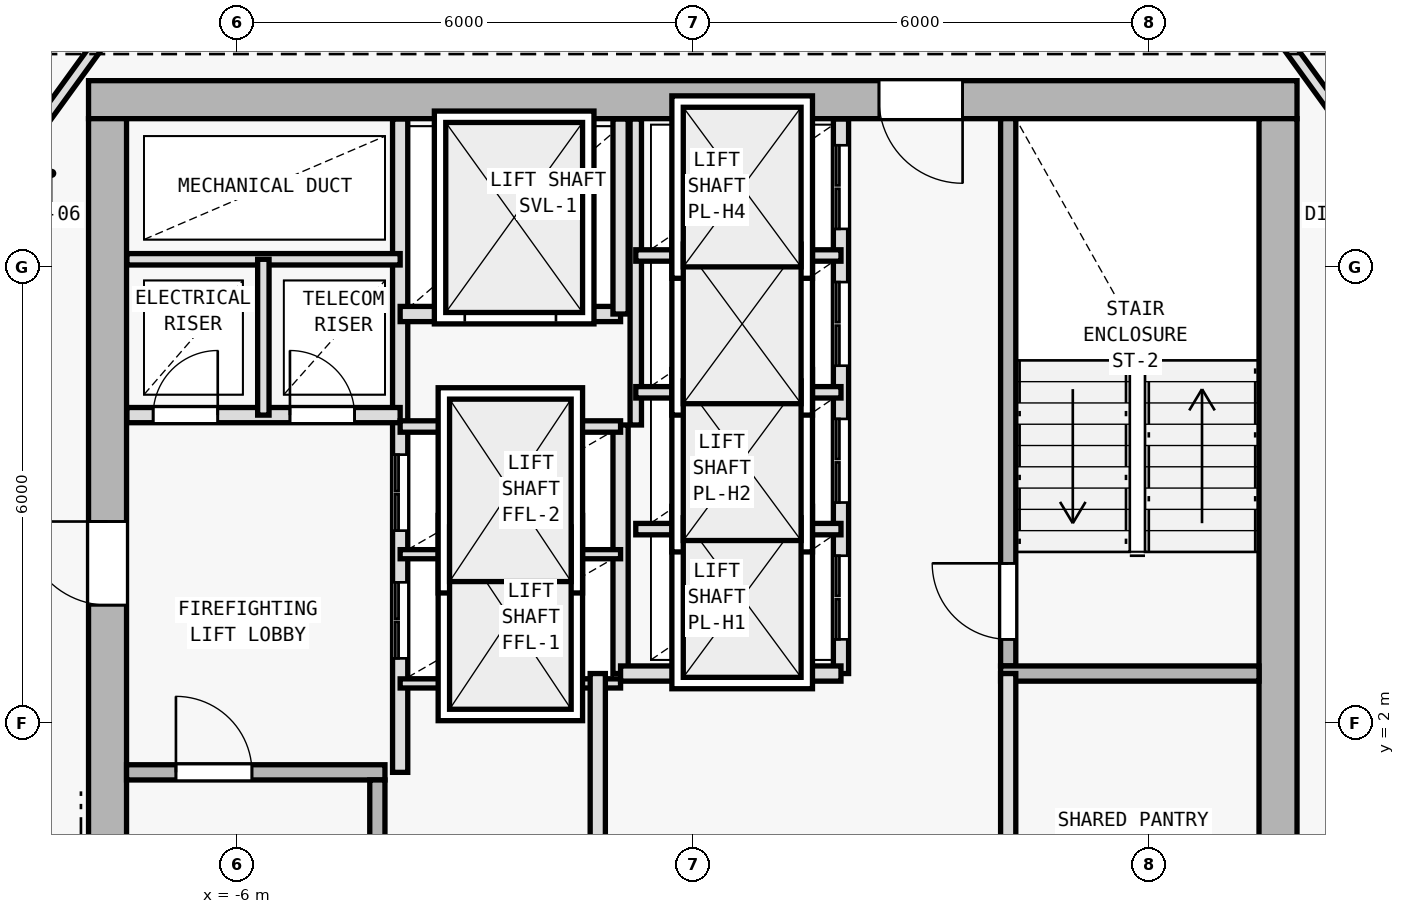
"""IFC4 building model, lengths in metres.
Left out: names, types, materials, properties, quantities, classifications, styles, units other than length and angle.
Written with IfcOpenShell. Run it as: python <this file> out.ifc"""

import sys

from ifc_helpers import new_model, si_unit, direction, frame, frame_2d, origin, origin_2d, place, context, subcontext, project, spatial, rectangle, i_section, extrude, element, fill, save


model = new_model("IFC4")
c1 = context("Model", 3, precision=1e-05, world=origin(), true_north=direction((0.0, 1.0)))
c2 = subcontext(c1, "Body", "Model", "MODEL_VIEW")
j1 = project(units=[si_unit("LENGTHUNIT", "METRE"), si_unit("PLANEANGLEUNIT", "RADIAN")], contexts=[c1])
p1 = place(None, origin())
s1 = spatial("IfcSite", under=j1, at=p1, CompositionType="ELEMENT")
p2 = place(p1, origin())
s2 = spatial("IfcBuilding", under=s1, at=p2, CompositionType="ELEMENT")
p3 = place(p2, frame((0.0, 0.0, 250.8)))
s3 = spatial("IfcBuildingStorey", under=s2, at=p3, CompositionType="ELEMENT", Elevation=250.8)
for number, where, z_axis, x_axis in (
    (1, (7.7, 10.2, 0.0), (0.0, 0.0, 1.0), (1.0, 0.0, 0.0)),
    (2, (-7.7, 10.2, 0.0), (0.0, 0.0, 1.0), (1.0, 0.0, 0.0)),
    (3, (7.7, 0.4, 0.0), (0.0, 0.0, 1.0), (1.0, 0.0, 0.0)),
    (4, (-7.7, 2.0, 0.0), (0.0, 0.0, 1.0), (1.0, 0.0, 0.0)),
):
    element("IfcColumn", number, at=place(p3, frame(where, z_axis=z_axis, x_axis=x_axis)), inside=s3, PredefinedType="COLUMN", context=c2, shape_type="SweptSolid", body=[
        extrude(i_section(OverallWidth=0.374, OverallDepth=0.372, WebThickness=0.012, FlangeThickness=0.02, FilletRadius=0.015, at=origin_2d()), origin(), (0.0, 0.0, 1.0), 3.6),
    ])
p4 = place(p3, frame((7.95, 10.2, 0.0), z_axis=(0.0, 0.0, 1.0), x_axis=(-1.0, 0.0, 0.0)))
e5 = element("IfcWall", 5, at=p4, inside=s3, PredefinedType="SHEAR", context=c2, shape_type="SweptSolid", body=[
    extrude(rectangle(XDim=15.9, YDim=0.5, at=frame_2d((7.95, 0.0))), origin(), (0.0, 0.0, 1.0), 3.35),
])
p5 = place(p4, frame((4.4, 0.0, 0.0)))
e6 = element("IfcOpeningElement", 6, at=p5, cuts=e5, PredefinedType="OPENING", context=c2, shape_type="SweptSolid", body=[
    extrude(rectangle(XDim=1.1, YDim=2.15, at=frame_2d((0.55, 1.075))), frame((0.0, 0.26, 0.0), z_axis=(0.0, -1.0, 0.0), x_axis=(1.0, 0.0, 0.0)), (0.0, 0.0, 1.0), 0.52),
])
p6 = place(p3, frame((-7.7, -9.15, 0.0), z_axis=(0.0, 0.0, 1.0), x_axis=(0.0, 1.0, 0.0)))
e7 = element("IfcWall", 7, at=p6, inside=s3, PredefinedType="SHEAR", context=c2, shape_type="SweptSolid", body=[
    extrude(rectangle(XDim=19.1, YDim=0.5, at=frame_2d((9.55, 0.0))), origin(), (0.0, 0.0, 1.0), 3.35),
])
p7 = place(p6, frame((12.7, 0.0, 0.0)))
e8 = element("IfcOpeningElement", 8, at=p7, cuts=e7, PredefinedType="OPENING", context=c2, shape_type="SweptSolid", body=[
    extrude(rectangle(XDim=1.1, YDim=2.15, at=frame_2d((0.55, 1.075))), frame((0.0, 0.26, 0.0), z_axis=(0.0, -1.0, 0.0), x_axis=(1.0, 0.0, 0.0)), (0.0, 0.0, 1.0), 0.52),
])
p8 = place(p3, frame((7.7, 9.95, 0.0), z_axis=(0.0, 0.0, 1.0), x_axis=(0.0, -1.0, 0.0)))
e9 = element("IfcWall", 9, at=p8, inside=s3, PredefinedType="SHEAR", context=c2, shape_type="SweptSolid", body=[
    extrude(rectangle(XDim=19.1, YDim=0.5, at=frame_2d((9.55, 0.0))), origin(), (0.0, 0.0, 1.0), 3.35),
])
p9 = place(p3, frame((-7.45, 1.35, 0.0), z_axis=(0.0, 0.0, 1.0), x_axis=(1.0, 0.0, 0.0)))
e10 = element("IfcWall", 10, at=p9, inside=s3, PredefinedType="SOLIDWALL", context=c2, shape_type="SweptSolid", body=[
    extrude(rectangle(XDim=3.4, YDim=0.2, at=frame_2d((1.7, 0.0))), origin(), (0.0, 0.0, 1.0), 3.35),
])
p10 = place(p9, frame((0.65, 0.0, 0.0)))
e11 = element("IfcOpeningElement", 11, at=p10, cuts=e10, PredefinedType="OPENING", context=c2, shape_type="SweptSolid", body=[
    extrude(rectangle(XDim=1.0, YDim=2.15, at=frame_2d((0.5, 1.075))), frame((0.0, 0.11, 0.0), z_axis=(0.0, -1.0, 0.0), x_axis=(1.0, 0.0, 0.0)), (0.0, 0.0, 1.0), 0.22),
])
p11 = place(p3, frame((-4.15, -5.95, 0.0), z_axis=(0.0, 0.0, 1.0), x_axis=(0.0, 1.0, 0.0)))
e12 = element("IfcWall", 12, at=p11, inside=s3, PredefinedType="SOLIDWALL", context=c2, shape_type="SweptSolid", body=[
    extrude(rectangle(XDim=7.2, YDim=0.2, at=frame_2d((3.6, 0.0))), origin(), (0.0, 0.0, 1.0), 3.35),
])
p12 = place(p3, frame((-3.85, 1.35, 0.0), z_axis=(0.0, 0.0, 1.0), x_axis=(0.0, 1.0, 0.0)))
e13 = element("IfcWall", 13, at=p12, inside=s3, PredefinedType="SOLIDWALL", context=c2, shape_type="SweptSolid", body=[
    extrude(rectangle(XDim=8.595, YDim=0.2, at=frame_2d((4.297, 0.0))), origin(), (0.0, 0.0, 1.0), 3.35),
])
p13 = place(p12, frame((1.5, 0.0, 0.0)))
e14 = element("IfcOpeningElement", 14, at=p13, cuts=e13, PredefinedType="OPENING", context=c2, shape_type="SweptSolid", body=[
    extrude(rectangle(XDim=1.0, YDim=2.15, at=frame_2d((0.5, 1.075))), frame((0.0, 0.11, 0.0), z_axis=(0.0, -1.0, 0.0), x_axis=(1.0, 0.0, 0.0)), (0.0, 0.0, 1.0), 0.22),
])
p14 = place(p12, frame((3.18, 0.0, 0.0)))
e15 = element("IfcOpeningElement", 15, at=p14, cuts=e13, PredefinedType="OPENING", context=c2, shape_type="SweptSolid", body=[
    extrude(rectangle(XDim=1.0, YDim=2.15, at=frame_2d((0.5, 1.075))), frame((0.0, 0.11, 0.0), z_axis=(0.0, -1.0, 0.0), x_axis=(1.0, 0.0, 0.0)), (0.0, 0.0, 1.0), 0.22),
])
p15 = place(p3, frame((-7.445, 6.05, 0.0), z_axis=(0.0, 0.0, 1.0), x_axis=(1.0, 0.0, 0.0)))
e16 = element("IfcWall", 16, at=p15, inside=s3, PredefinedType="SOLIDWALL", context=c2, shape_type="SweptSolid", body=[
    extrude(rectangle(XDim=3.595, YDim=0.2, at=frame_2d((1.797, 0.0))), origin(), (0.0, 0.0, 1.0), 3.35),
])
p16 = place(p15, frame((0.345, 0.0, 0.0)))
e17 = element("IfcOpeningElement", 17, at=p16, cuts=e16, PredefinedType="OPENING", context=c2, shape_type="SweptSolid", body=[
    extrude(rectangle(XDim=0.85, YDim=2.1, at=frame_2d((0.425, 1.05))), frame((0.0, 0.11, 0.0), z_axis=(0.0, -1.0, 0.0), x_axis=(1.0, 0.0, 0.0)), (0.0, 0.0, 1.0), 0.22),
])
p17 = place(p15, frame((2.145, 0.0, 0.0)))
e18 = element("IfcOpeningElement", 18, at=p17, cuts=e16, PredefinedType="OPENING", context=c2, shape_type="SweptSolid", body=[
    extrude(rectangle(XDim=0.85, YDim=2.1, at=frame_2d((0.425, 1.05))), frame((0.0, 0.11, 0.0), z_axis=(0.0, -1.0, 0.0), x_axis=(1.0, 0.0, 0.0)), (0.0, 0.0, 1.0), 0.22),
])
p18 = place(p3, frame((-7.445, 8.1, 0.0), z_axis=(0.0, 0.0, 1.0), x_axis=(1.0, 0.0, 0.0)))
e19 = element("IfcWall", 19, at=p18, inside=s3, PredefinedType="PARTITIONING", context=c2, shape_type="SweptSolid", body=[
    extrude(rectangle(XDim=3.595, YDim=0.15, at=frame_2d((1.797, 0.0))), origin(), (0.0, 0.0, 1.0), 3.35),
])
p19 = place(p3, frame((-5.65, 6.05, 0.0), z_axis=(0.0, 0.0, 1.0), x_axis=(0.0, 1.0, 0.0)))
e20 = element("IfcWall", 20, at=p19, inside=s3, PredefinedType="PARTITIONING", context=c2, shape_type="SweptSolid", body=[
    extrude(rectangle(XDim=2.05, YDim=0.15, at=frame_2d((1.025, 0.0))), origin(), (0.0, 0.0, 1.0), 3.35),
])
p20 = place(p3, frame((4.15, 2.75, 0.0), z_axis=(0.0, 0.0, 1.0), x_axis=(0.0, 1.0, 0.0)))
e21 = element("IfcWall", 21, at=p20, inside=s3, PredefinedType="SOLIDWALL", context=c2, shape_type="SweptSolid", body=[
    extrude(rectangle(XDim=7.2, YDim=0.2, at=frame_2d((3.6, 0.0))), origin(), (0.0, 0.0, 1.0), 3.35),
])
p21 = place(p20, frame((0.35, 0.0, 0.0)))
e22 = element("IfcOpeningElement", 22, at=p21, cuts=e21, PredefinedType="OPENING", context=c2, shape_type="SweptSolid", body=[
    extrude(rectangle(XDim=1.0, YDim=2.15, at=frame_2d((0.5, 1.075))), frame((0.0, 0.11, 0.0), z_axis=(0.0, -1.0, 0.0), x_axis=(1.0, 0.0, 0.0)), (0.0, 0.0, 1.0), 0.22),
])
p22 = place(p3, frame((4.05, 2.65, 0.0), z_axis=(0.0, 0.0, 1.0), x_axis=(1.0, 0.0, 0.0)))
e23 = element("IfcWall", 23, at=p22, inside=s3, PredefinedType="SOLIDWALL", context=c2, shape_type="SweptSolid", body=[
    extrude(rectangle(XDim=3.4, YDim=0.2, at=frame_2d((1.7, 0.0))), origin(), (0.0, 0.0, 1.0), 3.35),
])
p23 = place(p3, frame((-0.95, 2.65, 0.0), z_axis=(0.0, 0.0, 1.0), x_axis=(0.0, 1.0, 0.0)))
e24 = element("IfcWall", 24, at=p23, inside=s3, PredefinedType="SOLIDWALL", context=c2, shape_type="SweptSolid", body=[
    extrude(rectangle(XDim=3.27, YDim=0.2, at=frame_2d((1.635, 0.0))), origin(), (0.0, 0.0, 1.0), 3.35),
])
for number, where, z_axis, x_axis in (
    (25, (-3.85, 2.52, 0.0), (0.0, 0.0, 1.0), (1.0, 0.0, 0.0)),
    (26, (-3.85, 4.22, 0.0), (0.0, 0.0, 1.0), (1.0, 0.0, 0.0)),
):
    element("IfcWall", number, at=place(p3, frame(where, z_axis=z_axis, x_axis=x_axis)), inside=s3, PredefinedType="PARTITIONING", context=c2, shape_type="SweptSolid", body=[
        extrude(rectangle(XDim=2.9, YDim=0.12, at=frame_2d((1.45, 0.0))), origin(), (0.0, 0.0, 1.0), 3.35),
    ])
p24 = place(p3, frame((-3.85, 5.9, 0.0), z_axis=(0.0, 0.0, 1.0), x_axis=(1.0, 0.0, 0.0)))
e27 = element("IfcWall", 27, at=p24, inside=s3, PredefinedType="PARTITIONING", context=c2, shape_type="SweptSolid", body=[
    extrude(rectangle(XDim=2.9, YDim=0.15, at=frame_2d((1.45, 0.0))), origin(), (0.0, 0.0, 1.0), 3.35),
])
p25 = place(p3, frame((-3.85, 7.38, 0.0), z_axis=(0.0, 0.0, 1.0), x_axis=(1.0, 0.0, 0.0)))
e28 = element("IfcWall", 28, at=p25, inside=s3, PredefinedType="SOLIDWALL", context=c2, shape_type="SweptSolid", body=[
    extrude(rectangle(XDim=2.9, YDim=0.2, at=frame_2d((1.45, 0.0))), origin(), (0.0, 0.0, 1.0), 3.35),
])
p26 = place(p25, frame((0.85, 0.0, 0.0)))
e29 = element("IfcOpeningElement", 29, at=p26, cuts=e28, PredefinedType="OPENING", context=c2, shape_type="SweptSolid", body=[
    extrude(rectangle(XDim=1.2, YDim=2.2, at=frame_2d((0.6, 1.1))), frame((0.0, 0.11, 0.0), z_axis=(0.0, -1.0, 0.0), x_axis=(1.0, 0.0, 0.0)), (0.0, 0.0, 1.0), 0.22),
])
p27 = place(p3, frame((-0.95, 7.38, 0.0), z_axis=(0.0, 0.0, 1.0), x_axis=(0.0, 1.0, 0.0)))
e30 = element("IfcWall", 30, at=p27, inside=s3, PredefinedType="SOLIDWALL", context=c2, shape_type="SweptSolid", body=[
    extrude(rectangle(XDim=2.565, YDim=0.2, at=frame_2d((1.283, 0.0))), origin(), (0.0, 0.0, 1.0), 3.35),
])
p28 = place(p3, frame((4.15, -6.05, 0.0), z_axis=(0.0, 0.0, 1.0), x_axis=(0.0, 1.0, 0.0)))
e31 = element("IfcWall", 31, at=p28, inside=s3, PredefinedType="SOLIDWALL", context=c2, shape_type="SweptSolid", body=[
    extrude(rectangle(XDim=8.7, YDim=0.2, at=frame_2d((4.35, 0.0))), origin(), (0.0, 0.0, 1.0), 3.35),
])
p29 = place(p28, frame((3.6, 0.0, 0.0)))
e32 = element("IfcOpeningElement", 32, at=p29, cuts=e31, PredefinedType="OPENING", context=c2, shape_type="SweptSolid", body=[
    extrude(rectangle(XDim=0.95, YDim=2.1, at=frame_2d((0.475, 1.05))), frame((0.0, 0.11, 0.0), z_axis=(0.0, -1.0, 0.0), x_axis=(1.0, 0.0, 0.0)), (0.0, 0.0, 1.0), 0.22),
])
p30 = place(p3, frame((-1.25, -6.05, 0.0), z_axis=(0.0, 0.0, 1.0), x_axis=(0.0, 1.0, 0.0)))
e33 = element("IfcWall", 33, at=p30, inside=s3, PredefinedType="SOLIDWALL", context=c2, shape_type="SweptSolid", body=[
    extrude(rectangle(XDim=8.7, YDim=0.2, at=frame_2d((4.35, 0.0))), origin(), (0.0, 0.0, 1.0), 3.35),
])
p31 = place(p30, frame((3.4, 0.0, 0.0)))
e34 = element("IfcOpeningElement", 34, at=p31, cuts=e33, PredefinedType="OPENING", context=c2, shape_type="SweptSolid", body=[
    extrude(rectangle(XDim=0.95, YDim=2.1, at=frame_2d((0.475, 1.05))), frame((0.0, 0.11, 0.0), z_axis=(0.0, -1.0, 0.0), x_axis=(1.0, 0.0, 0.0)), (0.0, 0.0, 1.0), 0.22),
])
p32 = place(p3, frame((1.95, 2.65, 0.0), z_axis=(0.0, 0.0, 1.0), x_axis=(0.0, 1.0, 0.0)))
e35 = element("IfcWall", 35, at=p32, inside=s3, PredefinedType="SOLIDWALL", context=c2, shape_type="SweptSolid", body=[
    extrude(rectangle(XDim=7.295, YDim=0.2, at=frame_2d((3.647, 0.0))), origin(), (0.0, 0.0, 1.0), 3.35),
])
p33 = place(p32, frame((0.45, 0.0, 0.0)))
e36 = element("IfcOpeningElement", 36, at=p33, cuts=e35, PredefinedType="OPENING", context=c2, shape_type="SweptSolid", body=[
    extrude(rectangle(XDim=1.1, YDim=2.15, at=frame_2d((0.55, 1.075))), frame((0.0, 0.11, 0.0), z_axis=(0.0, -1.0, 0.0), x_axis=(1.0, 0.0, 0.0)), (0.0, 0.0, 1.0), 0.22),
])
p34 = place(p32, frame((2.25, 0.0, 0.0)))
e37 = element("IfcOpeningElement", 37, at=p34, cuts=e35, PredefinedType="OPENING", context=c2, shape_type="SweptSolid", body=[
    extrude(rectangle(XDim=1.1, YDim=2.15, at=frame_2d((0.55, 1.075))), frame((0.0, 0.11, 0.0), z_axis=(0.0, -1.0, 0.0), x_axis=(1.0, 0.0, 0.0)), (0.0, 0.0, 1.0), 0.22),
])
p35 = place(p32, frame((4.05, 0.0, 0.0)))
e38 = element("IfcOpeningElement", 38, at=p35, cuts=e35, PredefinedType="OPENING", context=c2, shape_type="SweptSolid", body=[
    extrude(rectangle(XDim=1.1, YDim=2.15, at=frame_2d((0.55, 1.075))), frame((0.0, 0.11, 0.0), z_axis=(0.0, -1.0, 0.0), x_axis=(1.0, 0.0, 0.0)), (0.0, 0.0, 1.0), 0.22),
])
p36 = place(p32, frame((5.85, 0.0, 0.0)))
e39 = element("IfcOpeningElement", 39, at=p36, cuts=e35, PredefinedType="OPENING", context=c2, shape_type="SweptSolid", body=[
    extrude(rectangle(XDim=1.1, YDim=2.15, at=frame_2d((0.55, 1.075))), frame((0.0, 0.11, 0.0), z_axis=(0.0, -1.0, 0.0), x_axis=(1.0, 0.0, 0.0)), (0.0, 0.0, 1.0), 0.22),
])
p37 = place(p3, frame((-0.95, 2.65, 0.0), z_axis=(0.0, 0.0, 1.0), x_axis=(1.0, 0.0, 0.0)))
e40 = element("IfcWall", 40, at=p37, inside=s3, PredefinedType="SOLIDWALL", context=c2, shape_type="SweptSolid", body=[
    extrude(rectangle(XDim=2.9, YDim=0.2, at=frame_2d((1.45, 0.0))), origin(), (0.0, 0.0, 1.0), 3.35),
])
p38 = place(p3, frame((-0.75, 5.92, 0.0), z_axis=(0.0, 0.0, 1.0), x_axis=(0.0, 1.0, 0.0)))
e41 = element("IfcWall", 41, at=p38, inside=s3, PredefinedType="PARTITIONING", context=c2, shape_type="SweptSolid", body=[
    extrude(rectangle(XDim=4.025, YDim=0.15, at=frame_2d((2.013, 0.0))), origin(), (0.0, 0.0, 1.0), 3.35),
])
for number, where, z_axis, x_axis in (
    (42, (-0.75, 4.55, 0.0), (0.0, 0.0, 1.0), (1.0, 0.0, 0.0)),
    (43, (-0.75, 6.35, 0.0), (0.0, 0.0, 1.0), (1.0, 0.0, 0.0)),
    (44, (-0.75, 8.15, 0.0), (0.0, 0.0, 1.0), (1.0, 0.0, 0.0)),
):
    element("IfcWall", number, at=place(p3, frame(where, z_axis=z_axis, x_axis=x_axis)), inside=s3, PredefinedType="PARTITIONING", context=c2, shape_type="SweptSolid", body=[
        extrude(rectangle(XDim=2.7, YDim=0.15, at=frame_2d((1.35, 0.0))), origin(), (0.0, 0.0, 1.0), 3.35),
    ])
p39 = place(p3, frame((-9.78, 8.226, 0.0), z_axis=(0.0, 0.0, 1.0), x_axis=(0.586956386413, 0.809618552436, 0.0)))
e45 = element("IfcWall", 45, at=p39, inside=s3, PredefinedType="PARTITIONING", context=c2, shape_type="SweptSolid", body=[
    extrude(rectangle(XDim=5.008, YDim=0.15, at=frame_2d((2.504, 0.0))), origin(), (0.0, 0.0, 1.0), 2.875),
])
p40 = place(p39, frame((1.154, 0.0, 0.0)))
e46 = element("IfcOpeningElement", 46, at=p40, cuts=e45, PredefinedType="OPENING", context=c2, shape_type="SweptSolid", body=[
    extrude(rectangle(XDim=0.9, YDim=2.1, at=frame_2d((0.45, 1.05))), frame((0.0, 0.085, 0.0), z_axis=(0.0, -1.0, 0.0), x_axis=(1.0, 0.0, 0.0)), (0.0, 0.0, 1.0), 0.17),
])
p41 = place(p3, frame((6.841, 12.28, 0.0), z_axis=(0.0, 0.0, 1.0), x_axis=(0.586956386413, -0.809618552436, 0.0)))
e47 = element("IfcWall", 47, at=p41, inside=s3, PredefinedType="PARTITIONING", context=c2, shape_type="SweptSolid", body=[
    extrude(rectangle(XDim=5.008, YDim=0.15, at=frame_2d((2.504, 0.0))), origin(), (0.0, 0.0, 1.0), 2.775),
])
p42 = place(p41, frame((2.954, 0.0, 0.0)))
e48 = element("IfcOpeningElement", 48, at=p42, cuts=e47, PredefinedType="OPENING", context=c2, shape_type="SweptSolid", body=[
    extrude(rectangle(XDim=0.9, YDim=2.1, at=frame_2d((0.45, 1.05))), frame((0.0, 0.085, 0.0), z_axis=(0.0, -1.0, 0.0), x_axis=(1.0, 0.0, 0.0)), (0.0, 0.0, 1.0), 0.17),
])
p43 = place(p7, origin())
e49 = element("IfcDoor", 49, at=p43, inside=s3, OperationType="SINGLE_SWING_RIGHT", PredefinedType="DOOR", context=c2, shape_type="SweptSolid", body=[
    extrude(rectangle(XDim=1.1, YDim=2.15, at=frame_2d((0.55, 1.075))), frame((0.0, 0.025, 0.0), z_axis=(0.0, -1.0, 0.0), x_axis=(1.0, 0.0, 0.0)), (0.0, 0.0, 1.0), 0.05),
])
fill(e8, e49)
p44 = place(p5, origin())
e50 = element("IfcDoor", 50, at=p44, inside=s3, OperationType="SINGLE_SWING_LEFT", PredefinedType="DOOR", context=c2, shape_type="SweptSolid", body=[
    extrude(rectangle(XDim=1.1, YDim=2.15, at=frame_2d((0.55, 1.075))), frame((0.0, 0.025, 0.0), z_axis=(0.0, -1.0, 0.0), x_axis=(1.0, 0.0, 0.0)), (0.0, 0.0, 1.0), 0.05),
])
fill(e6, e50)
p45 = place(p10, origin())
e51 = element("IfcDoor", 51, at=p45, inside=s3, OperationType="SINGLE_SWING_LEFT", PredefinedType="DOOR", context=c2, shape_type="SweptSolid", body=[
    extrude(rectangle(XDim=1.0, YDim=2.15, at=frame_2d((0.5, 1.075))), frame((0.0, 0.025, 0.0), z_axis=(0.0, -1.0, 0.0), x_axis=(1.0, 0.0, 0.0)), (0.0, 0.0, 1.0), 0.05),
])
fill(e11, e51)
p46 = place(p16, origin())
e52 = element("IfcDoor", 52, at=p46, inside=s3, OperationType="SINGLE_SWING_RIGHT", PredefinedType="DOOR", context=c2, shape_type="SweptSolid", body=[
    extrude(rectangle(XDim=0.85, YDim=2.1, at=frame_2d((0.425, 1.05))), frame((0.0, 0.025, 0.0), z_axis=(0.0, -1.0, 0.0), x_axis=(1.0, 0.0, 0.0)), (0.0, 0.0, 1.0), 0.05),
])
fill(e17, e52)
p47 = place(p17, origin())
e53 = element("IfcDoor", 53, at=p47, inside=s3, OperationType="SINGLE_SWING_LEFT", PredefinedType="DOOR", context=c2, shape_type="SweptSolid", body=[
    extrude(rectangle(XDim=0.85, YDim=2.1, at=frame_2d((0.425, 1.05))), frame((0.0, 0.025, 0.0), z_axis=(0.0, -1.0, 0.0), x_axis=(1.0, 0.0, 0.0)), (0.0, 0.0, 1.0), 0.05),
])
fill(e18, e53)
p48 = place(p21, origin())
e54 = element("IfcDoor", 54, at=p48, inside=s3, OperationType="SINGLE_SWING_RIGHT", PredefinedType="DOOR", context=c2, shape_type="SweptSolid", body=[
    extrude(rectangle(XDim=1.0, YDim=2.15, at=frame_2d((0.5, 1.075))), frame((0.0, 0.025, 0.0), z_axis=(0.0, -1.0, 0.0), x_axis=(1.0, 0.0, 0.0)), (0.0, 0.0, 1.0), 0.05),
])
fill(e22, e54)
p49 = place(p26, origin())
e55 = element("IfcDoor", 55, at=p49, inside=s3, OperationType="DOUBLE_DOOR_SLIDING", PredefinedType="DOOR", context=c2, shape_type="SweptSolid", body=[
    extrude(rectangle(XDim=1.2, YDim=2.2, at=frame_2d((0.6, 1.1))), frame((0.0, 0.025, 0.0), z_axis=(0.0, -1.0, 0.0), x_axis=(1.0, 0.0, 0.0)), (0.0, 0.0, 1.0), 0.05),
])
fill(e29, e55)
p50 = place(p33, origin())
e56 = element("IfcDoor", 56, at=p50, inside=s3, OperationType="DOUBLE_DOOR_SLIDING", PredefinedType="DOOR", context=c2, shape_type="SweptSolid", body=[
    extrude(rectangle(XDim=1.1, YDim=2.15, at=frame_2d((0.55, 1.075))), frame((0.0, 0.025, 0.0), z_axis=(0.0, -1.0, 0.0), x_axis=(1.0, 0.0, 0.0)), (0.0, 0.0, 1.0), 0.05),
])
fill(e36, e56)
p51 = place(p34, origin())
e57 = element("IfcDoor", 57, at=p51, inside=s3, OperationType="DOUBLE_DOOR_SLIDING", PredefinedType="DOOR", context=c2, shape_type="SweptSolid", body=[
    extrude(rectangle(XDim=1.1, YDim=2.15, at=frame_2d((0.55, 1.075))), frame((0.0, 0.025, 0.0), z_axis=(0.0, -1.0, 0.0), x_axis=(1.0, 0.0, 0.0)), (0.0, 0.0, 1.0), 0.05),
])
fill(e37, e57)
p52 = place(p35, origin())
e58 = element("IfcDoor", 58, at=p52, inside=s3, OperationType="DOUBLE_DOOR_SLIDING", PredefinedType="DOOR", context=c2, shape_type="SweptSolid", body=[
    extrude(rectangle(XDim=1.1, YDim=2.15, at=frame_2d((0.55, 1.075))), frame((0.0, 0.025, 0.0), z_axis=(0.0, -1.0, 0.0), x_axis=(1.0, 0.0, 0.0)), (0.0, 0.0, 1.0), 0.05),
])
fill(e38, e58)
p53 = place(p36, origin())
e59 = element("IfcDoor", 59, at=p53, inside=s3, OperationType="DOUBLE_DOOR_SLIDING", PredefinedType="DOOR", context=c2, shape_type="SweptSolid", body=[
    extrude(rectangle(XDim=1.1, YDim=2.15, at=frame_2d((0.55, 1.075))), frame((0.0, 0.025, 0.0), z_axis=(0.0, -1.0, 0.0), x_axis=(1.0, 0.0, 0.0)), (0.0, 0.0, 1.0), 0.05),
])
fill(e39, e59)
p54 = place(p13, origin())
e60 = element("IfcDoor", 60, at=p54, inside=s3, OperationType="DOUBLE_DOOR_SLIDING", PredefinedType="DOOR", context=c2, shape_type="SweptSolid", body=[
    extrude(rectangle(XDim=1.0, YDim=2.15, at=frame_2d((0.5, 1.075))), frame((0.0, 0.025, 0.0), z_axis=(0.0, -1.0, 0.0), x_axis=(1.0, 0.0, 0.0)), (0.0, 0.0, 1.0), 0.05),
])
fill(e14, e60)
p55 = place(p14, origin())
e61 = element("IfcDoor", 61, at=p55, inside=s3, OperationType="DOUBLE_DOOR_SLIDING", PredefinedType="DOOR", context=c2, shape_type="SweptSolid", body=[
    extrude(rectangle(XDim=1.0, YDim=2.15, at=frame_2d((0.5, 1.075))), frame((0.0, 0.025, 0.0), z_axis=(0.0, -1.0, 0.0), x_axis=(1.0, 0.0, 0.0)), (0.0, 0.0, 1.0), 0.05),
])
fill(e15, e61)
save(model, sys.argv[1])
